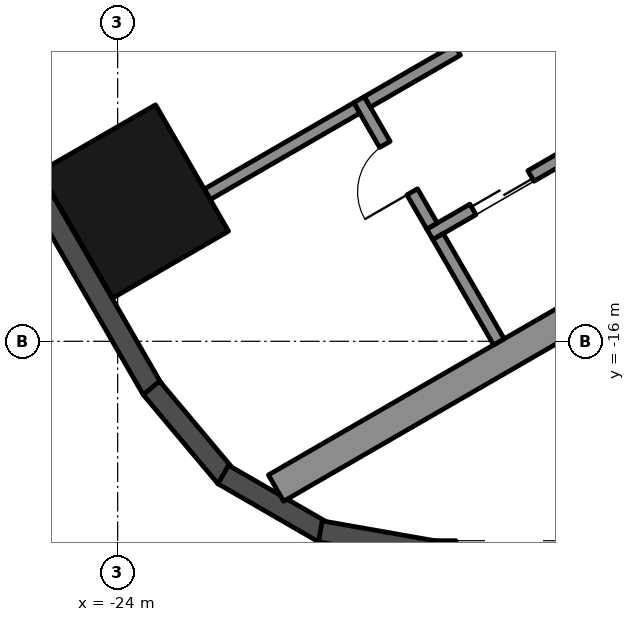
"""IFC4 building model, lengths in metres.
Left out: names, types, materials, properties, quantities, classifications, styles, units other than length and angle.
Written with IfcOpenShell. Run it as: python <this file> out.ifc"""

import sys

from ifc_helpers import new_model, si_unit, direction, frame, frame_2d, origin, origin_2d, place, context, subcontext, project, spatial, rectangle, hollow_rectangle, extrude, element, fill, save


model = new_model("IFC4")
c1 = context("Model", 3, precision=1e-05, world=origin(), true_north=direction((0.0, 1.0)))
c2 = subcontext(c1, "Body", "Model", "MODEL_VIEW")
j1 = project(units=[si_unit("LENGTHUNIT", "METRE"), si_unit("PLANEANGLEUNIT", "RADIAN")], contexts=[c1])
p1 = place(None, origin())
s1 = spatial("IfcSite", under=j1, at=p1, CompositionType="ELEMENT")
p2 = place(p1, origin())
s2 = spatial("IfcBuilding", under=s1, at=p2, CompositionType="ELEMENT")
p3 = place(p2, frame((0.0, 0.0, 194.7)))
s3 = spatial("IfcBuildingStorey", under=s2, at=p3, CompositionType="ELEMENT", Elevation=194.7)
p4 = place(p3, frame((-23.729, -13.7, 0.0), z_axis=(0.0, 0.0, 1.0), x_axis=(-0.5, 0.866025403784, 0.0)))
e1 = element("IfcColumn", 1, at=p4, inside=s3, PredefinedType="COLUMN", context=c2, shape_type="SweptSolid", body=[
    extrude(hollow_rectangle(XDim=2.4, YDim=2.2, WallThickness=0.06, at=origin_2d()), origin(), (0.0, 0.0, 1.0), 3.7),
])
p5 = place(p3, frame((-26.257, -11.893, 0.0), z_axis=(0.0, 0.0, 1.0), x_axis=(0.500018773155, -0.866014564827, 0.0)))
e2 = element("IfcWall", 2, at=p5, inside=s3, PredefinedType="SOLIDWALL", context=c2, shape_type="SweptSolid", body=[
    extrude(rectangle(XDim=5.658, YDim=0.35, at=frame_2d((2.829, 0.0))), origin(), (0.0, 0.0, 1.0), 3.55),
])
for number, where, z_axis, x_axis in (
    (3, (-23.445, -16.768, 0.0), (0.0, 0.0, 1.0), (0.643, -0.766, 0.0)),
    (4, (-22.264, -18.192, 0.0), (0.0, 0.0, 1.0), (0.866, -0.5, 0.0)),
):
    element("IfcWall", number, at=place(p3, frame(where, z_axis=z_axis, x_axis=x_axis)), inside=s3, PredefinedType="SOLIDWALL", context=c2, shape_type="SweptSolid", body=[
        extrude(rectangle(XDim=1.91, YDim=0.35, at=frame_2d((0.955, 0.0))), origin(), (0.0, 0.0, 1.0), 3.55),
    ])
p6 = place(p3, frame((-20.667, -19.126, 0.0), z_axis=(0.0, 0.0, 1.0), x_axis=(0.984798995425, -0.173697837091, 0.0)))
e5 = element("IfcWall", 5, at=p6, inside=s3, PredefinedType="SOLIDWALL", context=c2, shape_type="SweptSolid", body=[
    extrude(rectangle(XDim=1.91, YDim=0.35, at=frame_2d((0.955, 0.0))), origin(), (0.0, 0.0, 1.0), 3.55),
])
p7 = place(p3, frame((-18.816, -19.455, 0.0), z_axis=(0.0, 0.0, 1.0), x_axis=(1.0, 0.0, 0.0)))
e6 = element("IfcWall", 6, at=p7, inside=s3, PredefinedType="SOLIDWALL", context=c2, shape_type="SweptSolid", body=[
    extrude(rectangle(XDim=11.816, YDim=0.35, at=frame_2d((5.908, 0.0))), origin(), (0.0, 0.0, 1.0), 3.55),
])
p8 = place(p7, frame((0.381, 0.0, 0.3)))
e7 = element("IfcOpeningElement", 7, at=p8, cuts=e6, PredefinedType="OPENING", context=c2, shape_type="SweptSolid", body=[
    extrude(rectangle(XDim=1.9, YDim=2.65, at=frame_2d((0.95, 1.325))), frame((0.0, 0.185, 0.0), z_axis=(0.0, -1.0, 0.0), x_axis=(1.0, 0.0, 0.0)), (0.0, 0.0, 1.0), 0.37),
])
p9 = place(p7, frame((7.79, 0.0, 0.0)))
e8 = element("IfcOpeningElement", 8, at=p9, cuts=e6, PredefinedType="OPENING", context=c2, shape_type="SweptSolid", body=[
    extrude(rectangle(XDim=2.4, YDim=2.4, at=frame_2d((1.2, 1.2))), frame((0.0, 0.185, 0.0), z_axis=(0.0, -1.0, 0.0), x_axis=(1.0, 0.0, 0.0)), (0.0, 0.0, 1.0), 0.37),
])
p10 = place(p7, frame((3.741, 0.0, 0.3)))
e9 = element("IfcOpeningElement", 9, at=p10, cuts=e6, PredefinedType="OPENING", context=c2, shape_type="SweptSolid", body=[
    extrude(rectangle(XDim=1.7, YDim=2.65, at=frame_2d((0.85, 1.325))), frame((0.0, 0.185, 0.0), z_axis=(0.0, -1.0, 0.0), x_axis=(1.0, 0.0, 0.0)), (0.0, 0.0, 1.0), 0.37),
])
p11 = place(p7, frame((5.741, 0.0, 0.3)))
e10 = element("IfcOpeningElement", 10, at=p11, cuts=e6, PredefinedType="OPENING", context=c2, shape_type="SweptSolid", body=[
    extrude(rectangle(XDim=1.7, YDim=2.65, at=frame_2d((0.85, 1.325))), frame((0.0, 0.185, 0.0), z_axis=(0.0, -1.0, 0.0), x_axis=(1.0, 0.0, 0.0)), (0.0, 0.0, 1.0), 0.37),
])
p12 = place(p3, frame((-8.547, -10.997, 0.0), z_axis=(0.0, 0.0, 1.0), x_axis=(-0.866025009528, -0.500000682871, 0.0)))
e11 = element("IfcWall", 11, at=p12, inside=s3, PredefinedType="SHEAR", context=c2, shape_type="SweptSolid", body=[
    extrude(rectangle(XDim=14.837, YDim=0.5, at=frame_2d((7.418, 0.0))), origin(), (0.0, 0.0, 1.0), 3.5),
])
p13 = place(p3, frame((-10.068, -9.162, 0.0), z_axis=(0.0, 0.0, 1.0), x_axis=(-0.866032725843, -0.499987317609, 0.0)))
e12 = element("IfcWall", 12, at=p13, inside=s3, PredefinedType="SHEAR", context=c2, shape_type="SweptSolid", body=[
    extrude(rectangle(XDim=10.16, YDim=0.2, at=frame_2d((5.08, 0.0))), origin(), (0.0, 0.0, 1.0), 3.5),
])
p14 = place(p13, frame((0.62, 0.0, 0.0)))
e13 = element("IfcOpeningElement", 13, at=p14, cuts=e12, PredefinedType="OPENING", context=c2, shape_type="SweptSolid", body=[
    extrude(rectangle(XDim=1.1, YDim=2.1, at=frame_2d((0.55, 1.05))), frame((0.0, 0.11, 0.0), z_axis=(0.0, -1.0, 0.0), x_axis=(1.0, 0.0, 0.0)), (0.0, 0.0, 1.0), 0.22),
])
p15 = place(p13, frame((3.16, 0.0, 0.0)))
e14 = element("IfcOpeningElement", 14, at=p15, cuts=e12, PredefinedType="OPENING", context=c2, shape_type="SweptSolid", body=[
    extrude(rectangle(XDim=1.1, YDim=2.1, at=frame_2d((0.55, 1.05))), frame((0.0, 0.11, 0.0), z_axis=(0.0, -1.0, 0.0), x_axis=(1.0, 0.0, 0.0)), (0.0, 0.0, 1.0), 0.22),
])
p16 = place(p13, frame((5.7, 0.0, 0.0)))
e15 = element("IfcOpeningElement", 15, at=p16, cuts=e12, PredefinedType="OPENING", context=c2, shape_type="SweptSolid", body=[
    extrude(rectangle(XDim=1.1, YDim=2.1, at=frame_2d((0.55, 1.05))), frame((0.0, 0.11, 0.0), z_axis=(0.0, -1.0, 0.0), x_axis=(1.0, 0.0, 0.0)), (0.0, 0.0, 1.0), 0.22),
])
p17 = place(p13, frame((8.24, 0.0, 0.0)))
e16 = element("IfcOpeningElement", 16, at=p17, cuts=e12, PredefinedType="OPENING", context=c2, shape_type="SweptSolid", body=[
    extrude(rectangle(XDim=1.1, YDim=2.1, at=frame_2d((0.55, 1.05))), frame((0.0, 0.11, 0.0), z_axis=(0.0, -1.0, 0.0), x_axis=(1.0, 0.0, 0.0)), (0.0, 0.0, 1.0), 0.22),
])
p18 = place(p3, frame((-20.031, -12.026, 0.0), z_axis=(0.0, 0.0, 1.0), x_axis=(0.500033551112, -0.866006032174, 0.0)))
e17 = element("IfcWall", 17, at=p18, inside=s3, PredefinedType="SHEAR", context=c2, shape_type="SweptSolid", body=[
    extrude(rectangle(XDim=2.4, YDim=0.2, at=frame_2d((1.2, 0.0))), origin(), (0.0, 0.0, 1.0), 3.5),
])
p19 = place(p18, frame((0.85, 0.0, 0.0)))
e18 = element("IfcOpeningElement", 18, at=p19, cuts=e17, PredefinedType="OPENING", context=c2, shape_type="SweptSolid", body=[
    extrude(rectangle(XDim=0.9, YDim=2.1, at=frame_2d((0.45, 1.05))), frame((0.0, 0.11, 0.0), z_axis=(0.0, -1.0, 0.0), x_axis=(1.0, 0.0, 0.0)), (0.0, 0.0, 1.0), 0.22),
])
p20 = place(p3, frame((-18.413, -11.208, 0.0), z_axis=(0.0, 0.0, 1.0), x_axis=(-0.866038183914, -0.499977863513, 0.0)))
e19 = element("IfcWall", 19, at=p20, inside=s3, PredefinedType="SHEAR", context=c2, shape_type="SweptSolid", body=[
    extrude(rectangle(XDim=1.71, YDim=0.2, at=frame_2d((0.855, 0.0))), origin(), (0.0, 0.0, 1.0), 3.5),
])
p21 = place(p3, frame((-18.73, -14.278, 0.0), z_axis=(0.0, 0.0, 1.0), x_axis=(0.50002537861, -0.866010750942, 0.0)))
e20 = element("IfcWall", 20, at=p21, inside=s3, PredefinedType="SHEAR", context=c2, shape_type="SweptSolid", body=[
    extrude(rectangle(XDim=2.0, YDim=0.2, at=frame_2d((1.0, 0.0))), origin(), (0.0, 0.0, 1.0), 3.5),
])
p22 = place(p3, frame((-20.067, -12.163, 0.0), z_axis=(0.0, 0.0, 1.0), x_axis=(-0.866055327414, -0.49994816717, 0.0)))
e21 = element("IfcWall", 21, at=p22, inside=s3, PredefinedType="SHEAR", context=c2, shape_type="SweptSolid", body=[
    extrude(rectangle(XDim=2.84, YDim=0.2, at=frame_2d((1.42, 0.0))), origin(), (0.0, 0.0, 1.0), 3.5),
])
p23 = place(p17, origin())
e22 = element("IfcDoor", 22, at=p23, inside=s3, OperationType="DOUBLE_DOOR_SLIDING", PredefinedType="DOOR", context=c2, shape_type="SweptSolid", body=[
    extrude(rectangle(XDim=1.1, YDim=2.1, at=frame_2d((0.55, 1.05))), frame((0.0, 0.025, 0.0), z_axis=(0.0, -1.0, 0.0), x_axis=(1.0, 0.0, 0.0)), (0.0, 0.0, 1.0), 0.05),
])
fill(e16, e22)
p24 = place(p19, frame((0.9, 0.0, 0.0), z_axis=(0.0, 0.0, 1.0), x_axis=(-1.0, 0.0, 0.0)))
e23 = element("IfcDoor", 23, at=p24, inside=s3, OperationType="SINGLE_SWING_LEFT", PredefinedType="DOOR", context=c2, shape_type="SweptSolid", body=[
    extrude(rectangle(XDim=0.9, YDim=2.1, at=frame_2d((0.45, 1.05))), frame((0.0, 0.025, 0.0), z_axis=(0.0, -1.0, 0.0), x_axis=(1.0, 0.0, 0.0)), (0.0, 0.0, 1.0), 0.05),
])
fill(e18, e23)
save(model, sys.argv[1])
